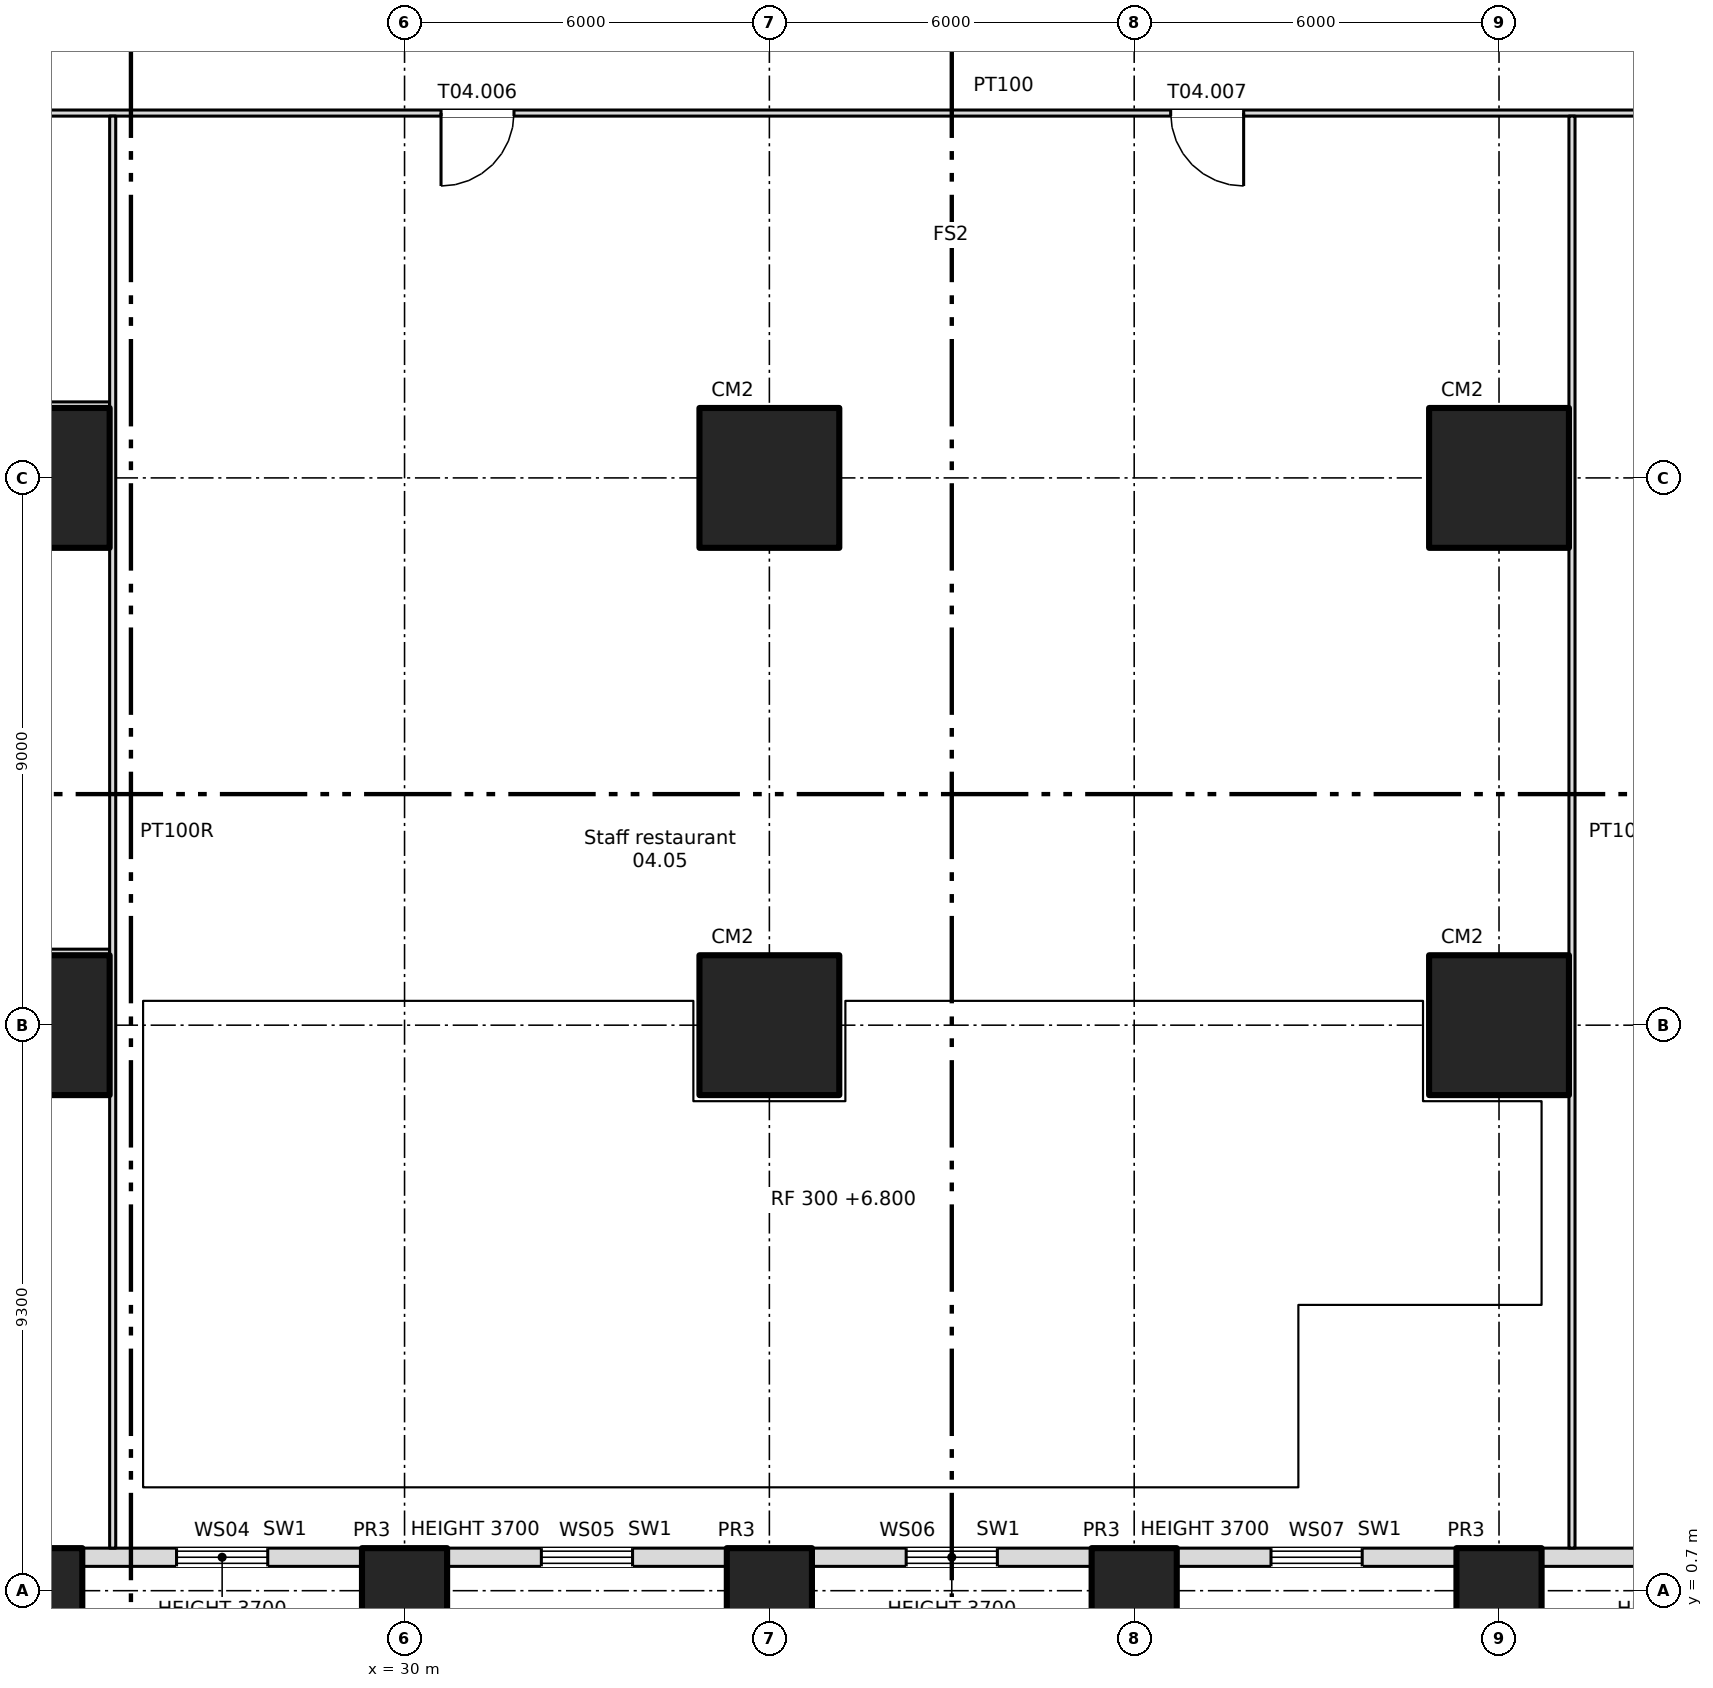
"""IFC4 building model, lengths in metres.
Left out: names, types, materials, properties, quantities, classifications, styles, units other than length and angle.
Written with IfcOpenShell. Run it as: python <this file> out.ifc"""

import sys

from ifc_helpers import new_model, si_unit, direction, frame, frame_2d, origin, origin_2d, place, context, subcontext, project, spatial, rectangle, extrude, element, fill, save


model = new_model("IFC4")
c1 = context("Model", 3, precision=1e-05, world=origin(), true_north=direction((0.0, 1.0)))
c2 = subcontext(c1, "Body", "Model", "MODEL_VIEW")
j1 = project(units=[si_unit("LENGTHUNIT", "METRE"), si_unit("PLANEANGLEUNIT", "RADIAN")], contexts=[c1])
p1 = place(None, origin())
s1 = spatial("IfcSite", under=j1, at=p1, CompositionType="ELEMENT")
p2 = place(p1, origin())
s2 = spatial("IfcBuilding", under=s1, at=p2, CompositionType="ELEMENT")
p3 = place(p2, frame((0.0, 0.0, 6.5)))
s3 = spatial("IfcBuildingStorey", under=s2, at=p3, CompositionType="ELEMENT", Elevation=6.5)
for number, where, z_axis, x_axis in (
    (1, (24.0, 0.7, -1.1), (0.0, 0.0, 1.0), (1.0, 0.0, 0.0)),
    (2, (30.0, 0.7, -1.1), (0.0, 0.0, 1.0), (1.0, 0.0, 0.0)),
    (3, (36.0, 0.7, -1.1), (0.0, 0.0, 1.0), (1.0, 0.0, 0.0)),
    (4, (42.0, 0.7, -1.1), (0.0, 0.0, 1.0), (1.0, 0.0, 0.0)),
    (5, (48.0, 0.7, -1.1), (0.0, 0.0, 1.0), (1.0, 0.0, 0.0)),
):
    element("IfcColumn", number, at=place(p3, frame(where, z_axis=z_axis, x_axis=x_axis)), inside=s3, PredefinedType="COLUMN", context=c2, shape_type="SweptSolid", body=[
        extrude(rectangle(XDim=1.4, YDim=1.4, at=origin_2d()), origin(), (0.0, 0.0, 1.0), 5.4),
    ])
for number, where, z_axis, x_axis in (
    (6, (24.0, 10.0, 0.0), (0.0, 0.0, 1.0), (1.0, 0.0, 0.0)),
    (7, (24.0, 19.0, 0.0), (0.0, 0.0, 1.0), (1.0, 0.0, 0.0)),
    (8, (36.0, 10.0, 0.0), (0.0, 0.0, 1.0), (1.0, 0.0, 0.0)),
    (9, (36.0, 19.0, 0.0), (0.0, 0.0, 1.0), (1.0, 0.0, 0.0)),
    (10, (48.0, 10.0, 0.0), (0.0, 0.0, 1.0), (1.0, 0.0, 0.0)),
    (11, (48.0, 19.0, 0.0), (0.0, 0.0, 1.0), (1.0, 0.0, 0.0)),
):
    element("IfcColumn", number, at=place(p3, frame(where, z_axis=z_axis, x_axis=x_axis)), inside=s3, PredefinedType="COLUMN", context=c2, shape_type="SweptSolid", body=[
        extrude(rectangle(XDim=2.3, YDim=2.3, at=origin_2d()), origin(), (0.0, 0.0, 1.0), 4.3),
    ])
p4 = place(p3, frame((24.7, 1.25, 0.0), z_axis=(0.0, 0.0, 1.0), x_axis=(1.0, 0.0, 0.0)))
e12 = element("IfcWall", 12, at=p4, inside=s3, PredefinedType="SOLIDWALL", context=c2, shape_type="SweptSolid", body=[
    extrude(rectangle(XDim=4.6, YDim=0.3, at=frame_2d((2.3, 0.0))), origin(), (0.0, 0.0, 1.0), 3.7),
])
p5 = place(p4, frame((1.55, 0.0, 0.9)))
e13 = element("IfcOpeningElement", 13, at=p5, cuts=e12, PredefinedType="OPENING", context=c2, shape_type="SweptSolid", body=[
    extrude(rectangle(XDim=1.5, YDim=2.4, at=frame_2d((0.75, 1.2))), frame((0.0, 0.16, 0.0), z_axis=(0.0, -1.0, 0.0), x_axis=(1.0, 0.0, 0.0)), (0.0, 0.0, 1.0), 0.32),
])
p6 = place(p3, frame((30.7, 1.25, 0.0), z_axis=(0.0, 0.0, 1.0), x_axis=(1.0, 0.0, 0.0)))
e14 = element("IfcWall", 14, at=p6, inside=s3, PredefinedType="SOLIDWALL", context=c2, shape_type="SweptSolid", body=[
    extrude(rectangle(XDim=4.6, YDim=0.3, at=frame_2d((2.3, 0.0))), origin(), (0.0, 0.0, 1.0), 3.7),
])
p7 = place(p6, frame((1.55, 0.0, 0.9)))
e15 = element("IfcOpeningElement", 15, at=p7, cuts=e14, PredefinedType="OPENING", context=c2, shape_type="SweptSolid", body=[
    extrude(rectangle(XDim=1.5, YDim=2.4, at=frame_2d((0.75, 1.2))), frame((0.0, 0.16, 0.0), z_axis=(0.0, -1.0, 0.0), x_axis=(1.0, 0.0, 0.0)), (0.0, 0.0, 1.0), 0.32),
])
p8 = place(p3, frame((36.7, 1.25, 0.0), z_axis=(0.0, 0.0, 1.0), x_axis=(1.0, 0.0, 0.0)))
e16 = element("IfcWall", 16, at=p8, inside=s3, PredefinedType="SOLIDWALL", context=c2, shape_type="SweptSolid", body=[
    extrude(rectangle(XDim=4.6, YDim=0.3, at=frame_2d((2.3, 0.0))), origin(), (0.0, 0.0, 1.0), 3.7),
])
p9 = place(p8, frame((1.55, 0.0, 0.9)))
e17 = element("IfcOpeningElement", 17, at=p9, cuts=e16, PredefinedType="OPENING", context=c2, shape_type="SweptSolid", body=[
    extrude(rectangle(XDim=1.5, YDim=2.4, at=frame_2d((0.75, 1.2))), frame((0.0, 0.16, 0.0), z_axis=(0.0, -1.0, 0.0), x_axis=(1.0, 0.0, 0.0)), (0.0, 0.0, 1.0), 0.32),
])
p10 = place(p3, frame((42.7, 1.25, 0.0), z_axis=(0.0, 0.0, 1.0), x_axis=(1.0, 0.0, 0.0)))
e18 = element("IfcWall", 18, at=p10, inside=s3, PredefinedType="SOLIDWALL", context=c2, shape_type="SweptSolid", body=[
    extrude(rectangle(XDim=4.6, YDim=0.3, at=frame_2d((2.3, 0.0))), origin(), (0.0, 0.0, 1.0), 3.7),
])
p11 = place(p10, frame((1.55, 0.0, 0.9)))
e19 = element("IfcOpeningElement", 19, at=p11, cuts=e18, PredefinedType="OPENING", context=c2, shape_type="SweptSolid", body=[
    extrude(rectangle(XDim=1.5, YDim=2.4, at=frame_2d((0.75, 1.2))), frame((0.0, 0.16, 0.0), z_axis=(0.0, -1.0, 0.0), x_axis=(1.0, 0.0, 0.0)), (0.0, 0.0, 1.0), 0.32),
])
p12 = place(p3, frame((48.7, 1.25, 0.0), z_axis=(0.0, 0.0, 1.0), x_axis=(1.0, 0.0, 0.0)))
e20 = element("IfcWall", 20, at=p12, inside=s3, PredefinedType="SOLIDWALL", context=c2, shape_type="SweptSolid", body=[
    extrude(rectangle(XDim=4.6, YDim=0.3, at=frame_2d((2.3, 0.0))), origin(), (0.0, 0.0, 1.0), 3.7),
])
p13 = place(p12, frame((1.55, 0.0, 0.9)))
e21 = element("IfcOpeningElement", 21, at=p13, cuts=e20, PredefinedType="OPENING", context=c2, shape_type="SweptSolid", body=[
    extrude(rectangle(XDim=1.5, YDim=2.4, at=frame_2d((0.75, 1.2))), frame((0.0, 0.16, 0.0), z_axis=(0.0, -1.0, 0.0), x_axis=(1.0, 0.0, 0.0)), (0.0, 0.0, 1.0), 0.32),
])
p14 = place(p3, frame((3.25, 11.2, 0.0), z_axis=(0.0, 0.0, 1.0), x_axis=(1.0, 0.0, 0.0)))
e22 = element("IfcWall", 22, at=p14, inside=s3, PredefinedType="PARTITIONING", context=c2, shape_type="SweptSolid", body=[
    extrude(rectangle(XDim=21.9, YDim=0.1, at=frame_2d((10.95, 0.0))), origin(), (0.0, 0.0, 1.0), 4.3),
])
p15 = place(p14, frame((12.413, 0.0, 0.0)))
e23 = element("IfcOpeningElement", 23, at=p15, cuts=e22, PredefinedType="OPENING", context=c2, shape_type="SweptSolid", body=[
    extrude(rectangle(XDim=1.0, YDim=2.1, at=frame_2d((0.5, 1.05))), frame((0.0, 0.06, 0.0), z_axis=(0.0, -1.0, 0.0), x_axis=(1.0, 0.0, 0.0)), (0.0, 0.0, 1.0), 0.12),
])
p16 = place(p14, frame((18.438, 0.0, 0.0)))
e24 = element("IfcOpeningElement", 24, at=p16, cuts=e22, PredefinedType="OPENING", context=c2, shape_type="SweptSolid", body=[
    extrude(rectangle(XDim=1.0, YDim=2.1, at=frame_2d((0.5, 1.05))), frame((0.0, 0.06, 0.0), z_axis=(0.0, -1.0, 0.0), x_axis=(1.0, 0.0, 0.0)), (0.0, 0.0, 1.0), 0.12),
])
p17 = place(p3, frame((10.0, 20.2, 0.0), z_axis=(0.0, 0.0, 1.0), x_axis=(1.0, 0.0, 0.0)))
e25 = element("IfcWall", 25, at=p17, inside=s3, PredefinedType="PARTITIONING", context=c2, shape_type="SweptSolid", body=[
    extrude(rectangle(XDim=15.15, YDim=0.1, at=frame_2d((7.575, 0.0))), origin(), (0.0, 0.0, 1.0), 4.3),
])
p18 = place(p17, frame((10.35, 0.0, 0.0)))
e26 = element("IfcOpeningElement", 26, at=p18, cuts=e25, PredefinedType="OPENING", context=c2, shape_type="SweptSolid", body=[
    extrude(rectangle(XDim=1.0, YDim=2.1, at=frame_2d((0.5, 1.05))), frame((0.0, 0.06, 0.0), z_axis=(0.0, -1.0, 0.0), x_axis=(1.0, 0.0, 0.0)), (0.0, 0.0, 1.0), 0.12),
])
p19 = place(p17, frame((11.6, 0.0, 0.0)))
e27 = element("IfcOpeningElement", 27, at=p19, cuts=e25, PredefinedType="OPENING", context=c2, shape_type="SweptSolid", body=[
    extrude(rectangle(XDim=1.0, YDim=2.1, at=frame_2d((0.5, 1.05))), frame((0.0, 0.06, 0.0), z_axis=(0.0, -1.0, 0.0), x_axis=(1.0, 0.0, 0.0)), (0.0, 0.0, 1.0), 0.12),
])
p20 = place(p3, frame((10.09, 25.0, 0.0), z_axis=(0.0, 0.0, 1.0), x_axis=(1.0, 0.0, 0.0)))
e28 = element("IfcWall", 28, at=p20, inside=s3, PredefinedType="PARTITIONING", context=c2, shape_type="SweptSolid", body=[
    extrude(rectangle(XDim=51.02, YDim=0.1, at=frame_2d((25.51, 0.0))), origin(), (0.0, 0.0, 1.0), 4.3),
])
p21 = place(p20, frame((20.51, 0.0, 0.0)))
e29 = element("IfcOpeningElement", 29, at=p21, cuts=e28, PredefinedType="OPENING", context=c2, shape_type="SweptSolid", body=[
    extrude(rectangle(XDim=1.2, YDim=2.1, at=frame_2d((0.6, 1.05))), frame((0.0, 0.06, 0.0), z_axis=(0.0, -1.0, 0.0), x_axis=(1.0, 0.0, 0.0)), (0.0, 0.0, 1.0), 0.12),
])
p22 = place(p20, frame((32.51, 0.0, 0.0)))
e30 = element("IfcOpeningElement", 30, at=p22, cuts=e28, PredefinedType="OPENING", context=c2, shape_type="SweptSolid", body=[
    extrude(rectangle(XDim=1.2, YDim=2.1, at=frame_2d((0.6, 1.05))), frame((0.0, 0.06, 0.0), z_axis=(0.0, -1.0, 0.0), x_axis=(1.0, 0.0, 0.0)), (0.0, 0.0, 1.0), 0.12),
])
p23 = place(p20, frame((41.498, 0.0, 0.0)))
e31 = element("IfcOpeningElement", 31, at=p23, cuts=e28, PredefinedType="OPENING", context=c2, shape_type="SweptSolid", body=[
    extrude(rectangle(XDim=1.2, YDim=2.1, at=frame_2d((0.6, 1.05))), frame((0.0, 0.06, 0.0), z_axis=(0.0, -1.0, 0.0), x_axis=(1.0, 0.0, 0.0)), (0.0, 0.0, 1.0), 0.12),
])
p24 = place(p20, frame((47.472, 0.0, 0.0)))
e32 = element("IfcOpeningElement", 32, at=p24, cuts=e28, PredefinedType="OPENING", context=c2, shape_type="SweptSolid", body=[
    extrude(rectangle(XDim=1.2, YDim=2.1, at=frame_2d((0.6, 1.05))), frame((0.0, 0.06, 0.0), z_axis=(0.0, -1.0, 0.0), x_axis=(1.0, 0.0, 0.0)), (0.0, 0.0, 1.0), 0.12),
])
p25 = place(p20, frame((1.073, 0.0, 0.0)))
e33 = element("IfcOpeningElement", 33, at=p25, cuts=e28, PredefinedType="OPENING", context=c2, shape_type="SweptSolid", body=[
    extrude(rectangle(XDim=1.0, YDim=2.1, at=frame_2d((0.5, 1.05))), frame((0.0, 0.06, 0.0), z_axis=(0.0, -1.0, 0.0), x_axis=(1.0, 0.0, 0.0)), (0.0, 0.0, 1.0), 0.12),
])
p26 = place(p20, frame((4.298, 0.0, 0.0)))
e34 = element("IfcOpeningElement", 34, at=p26, cuts=e28, PredefinedType="OPENING", context=c2, shape_type="SweptSolid", body=[
    extrude(rectangle(XDim=1.0, YDim=2.1, at=frame_2d((0.5, 1.05))), frame((0.0, 0.06, 0.0), z_axis=(0.0, -1.0, 0.0), x_axis=(1.0, 0.0, 0.0)), (0.0, 0.0, 1.0), 0.12),
])
p27 = place(p20, frame((8.085, 0.0, 0.0)))
e35 = element("IfcOpeningElement", 35, at=p27, cuts=e28, PredefinedType="OPENING", context=c2, shape_type="SweptSolid", body=[
    extrude(rectangle(XDim=1.0, YDim=2.1, at=frame_2d((0.5, 1.05))), frame((0.0, 0.06, 0.0), z_axis=(0.0, -1.0, 0.0), x_axis=(1.0, 0.0, 0.0)), (0.0, 0.0, 1.0), 0.12),
])
p28 = place(p20, frame((12.435, 0.0, 0.0)))
e36 = element("IfcOpeningElement", 36, at=p28, cuts=e28, PredefinedType="OPENING", context=c2, shape_type="SweptSolid", body=[
    extrude(rectangle(XDim=1.0, YDim=2.1, at=frame_2d((0.5, 1.05))), frame((0.0, 0.06, 0.0), z_axis=(0.0, -1.0, 0.0), x_axis=(1.0, 0.0, 0.0)), (0.0, 0.0, 1.0), 0.12),
])
for number, where, z_axis, x_axis in (
    (37, (25.2, 1.4, 0.0), (0.0, 0.0, 1.0), (0.0, 1.0, 0.0)),
    (38, (49.2, 1.4, 0.0), (0.0, 0.0, 1.0), (0.0, 1.0, 0.0)),
):
    element("IfcWall", number, at=place(p3, frame(where, z_axis=z_axis, x_axis=x_axis)), inside=s3, PredefinedType="PARTITIONING", context=c2, shape_type="SweptSolid", body=[
        extrude(rectangle(XDim=23.55, YDim=0.1, at=frame_2d((11.775, 0.0))), origin(), (0.0, 0.0, 1.0), 4.3),
    ])
p29 = place(p5, origin())
e39 = element("IfcWindow", 39, at=p29, inside=s3, PartitioningType="SINGLE_PANEL", PredefinedType="WINDOW", context=c2, shape_type="SweptSolid", body=[
    extrude(rectangle(XDim=1.5, YDim=2.4, at=frame_2d((0.75, 1.2))), frame((0.0, 0.03, 0.0), z_axis=(0.0, -1.0, 0.0), x_axis=(1.0, 0.0, 0.0)), (0.0, 0.0, 1.0), 0.06),
])
fill(e13, e39)
p30 = place(p7, origin())
e40 = element("IfcWindow", 40, at=p30, inside=s3, PartitioningType="SINGLE_PANEL", PredefinedType="WINDOW", context=c2, shape_type="SweptSolid", body=[
    extrude(rectangle(XDim=1.5, YDim=2.4, at=frame_2d((0.75, 1.2))), frame((0.0, 0.03, 0.0), z_axis=(0.0, -1.0, 0.0), x_axis=(1.0, 0.0, 0.0)), (0.0, 0.0, 1.0), 0.06),
])
fill(e15, e40)
p31 = place(p9, origin())
e41 = element("IfcWindow", 41, at=p31, inside=s3, PartitioningType="SINGLE_PANEL", PredefinedType="WINDOW", context=c2, shape_type="SweptSolid", body=[
    extrude(rectangle(XDim=1.5, YDim=2.4, at=frame_2d((0.75, 1.2))), frame((0.0, 0.03, 0.0), z_axis=(0.0, -1.0, 0.0), x_axis=(1.0, 0.0, 0.0)), (0.0, 0.0, 1.0), 0.06),
])
fill(e17, e41)
p32 = place(p11, origin())
e42 = element("IfcWindow", 42, at=p32, inside=s3, PartitioningType="SINGLE_PANEL", PredefinedType="WINDOW", context=c2, shape_type="SweptSolid", body=[
    extrude(rectangle(XDim=1.5, YDim=2.4, at=frame_2d((0.75, 1.2))), frame((0.0, 0.03, 0.0), z_axis=(0.0, -1.0, 0.0), x_axis=(1.0, 0.0, 0.0)), (0.0, 0.0, 1.0), 0.06),
])
fill(e19, e42)
p33 = place(p21, origin())
e43 = element("IfcDoor", 43, at=p33, inside=s3, OperationType="SINGLE_SWING_LEFT", PredefinedType="DOOR", context=c2, shape_type="SweptSolid", body=[
    extrude(rectangle(XDim=1.2, YDim=2.1, at=frame_2d((0.6, 1.05))), frame((0.0, 0.025, 0.0), z_axis=(0.0, -1.0, 0.0), x_axis=(1.0, 0.0, 0.0)), (0.0, 0.0, 1.0), 0.05),
])
fill(e29, e43)
p34 = place(p22, origin())
e44 = element("IfcDoor", 44, at=p34, inside=s3, OperationType="SINGLE_SWING_RIGHT", PredefinedType="DOOR", context=c2, shape_type="SweptSolid", body=[
    extrude(rectangle(XDim=1.2, YDim=2.1, at=frame_2d((0.6, 1.05))), frame((0.0, 0.025, 0.0), z_axis=(0.0, -1.0, 0.0), x_axis=(1.0, 0.0, 0.0)), (0.0, 0.0, 1.0), 0.05),
])
fill(e30, e44)
save(model, sys.argv[1])
